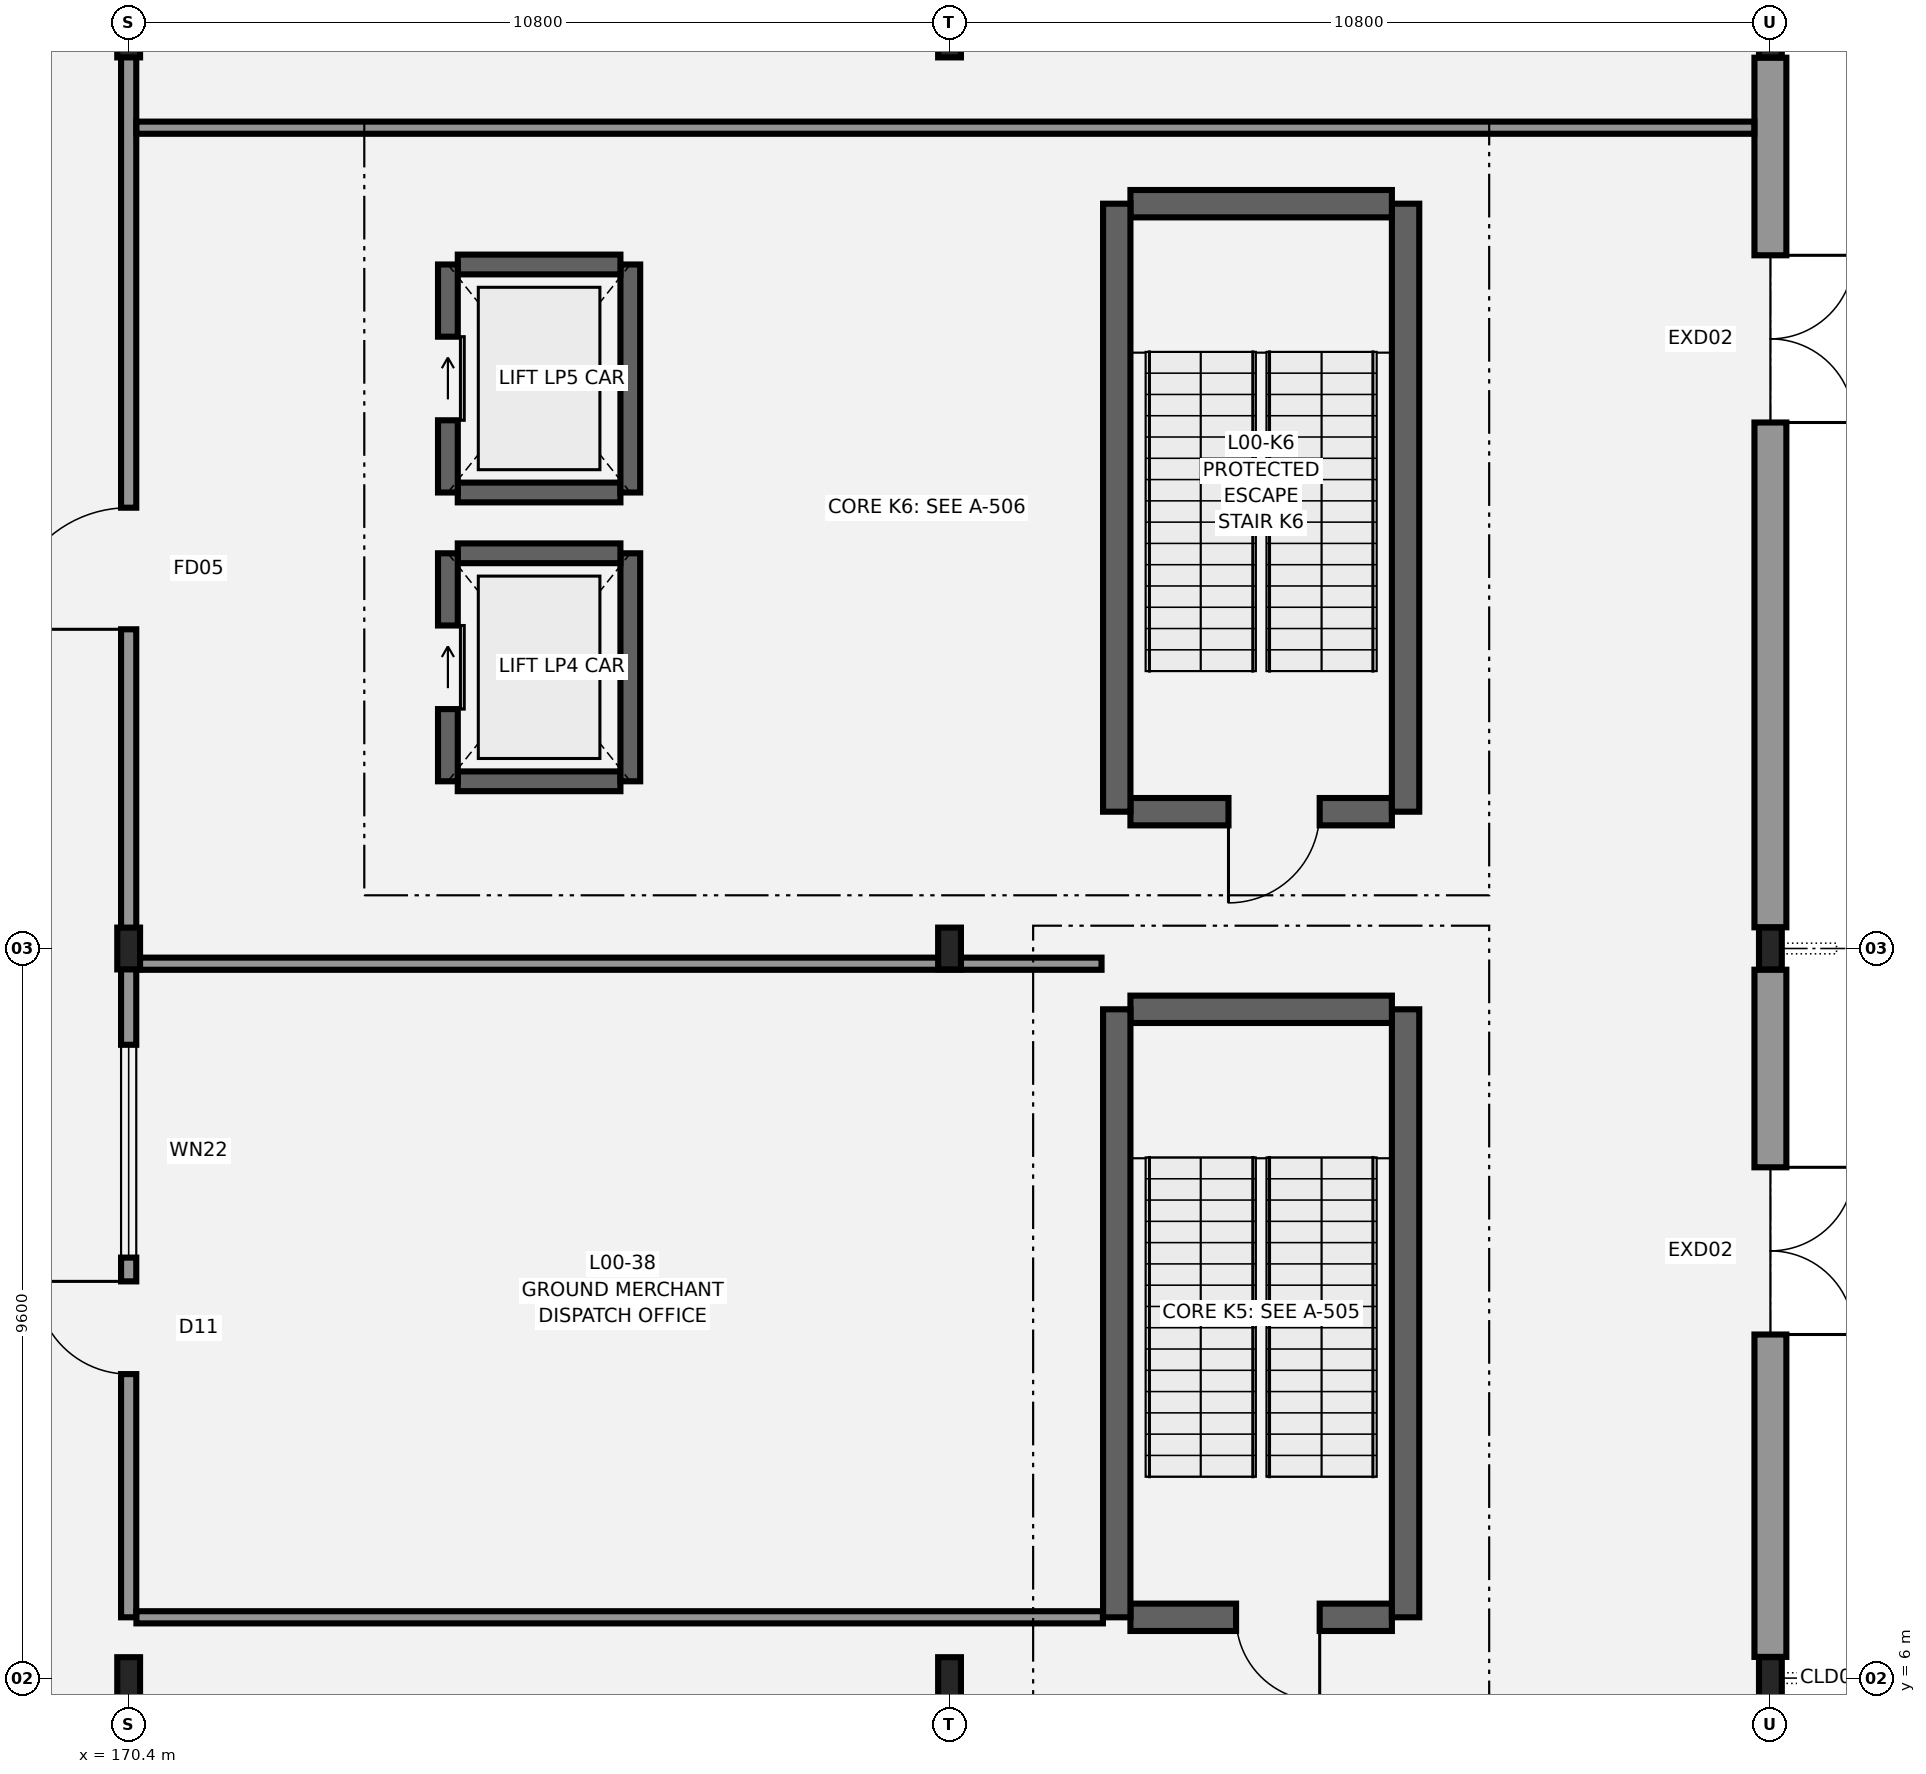
"""IFC4 building model, lengths in metres.
Left out: names, types, materials, properties, quantities, classifications, styles, units other than length and angle.
Written with IfcOpenShell. Run it as: python <this file> out.ifc"""

import sys

from ifc_helpers import new_model, si_unit, direction, frame, frame_2d, origin, origin_2d, place, context, subcontext, project, spatial, rectangle, i_section, extrude, element, fill, save


model = new_model("IFC4")
c1 = context("Model", 3, precision=1e-05, world=origin(), true_north=direction((0.0, 1.0)))
c2 = subcontext(c1, "Body", "Model", "MODEL_VIEW")
j1 = project(units=[si_unit("LENGTHUNIT", "METRE"), si_unit("PLANEANGLEUNIT", "RADIAN")], contexts=[c1])
p1 = place(None, origin())
s1 = spatial("IfcSite", under=j1, at=p1, CompositionType="ELEMENT")
p2 = place(p1, origin())
s2 = spatial("IfcBuilding", under=s1, at=p2, CompositionType="ELEMENT")
p3 = place(p2, origin())
s3 = spatial("IfcBuildingStorey", under=s2, at=p3, CompositionType="ELEMENT", Elevation=0.0)
for number, where, z_axis, x_axis in (
    (1, (170.4, 6.0, 0.0), (0.0, 0.0, 1.0), (1.0, 0.0, 0.0)),
    (2, (170.4, 15.6, 0.0), (0.0, 0.0, 1.0), (1.0, 0.0, 0.0)),
    (3, (170.4, 27.6, 0.0), (0.0, 0.0, 1.0), (1.0, 0.0, 0.0)),
    (4, (181.2, 6.0, 0.0), (0.0, 0.0, 1.0), (1.0, 0.0, 0.0)),
    (5, (181.2, 15.6, 0.0), (0.0, 0.0, 1.0), (1.0, 0.0, 0.0)),
    (6, (181.2, 27.6, 0.0), (0.0, 0.0, 1.0), (1.0, 0.0, 0.0)),
    (7, (192.0, 6.0, 0.0), (0.0, 0.0, 1.0), (1.0, 0.0, 0.0)),
    (8, (192.0, 15.6, 0.0), (0.0, 0.0, 1.0), (1.0, 0.0, 0.0)),
    (9, (192.0, 27.6, 0.0), (0.0, 0.0, 1.0), (1.0, 0.0, 0.0)),
):
    element("IfcColumn", number, at=place(p3, frame(where, z_axis=z_axis, x_axis=x_axis)), inside=s3, PredefinedType="COLUMN", context=c2, shape_type="SweptSolid", body=[
        extrude(i_section(OverallWidth=0.3, OverallDepth=0.55, WebThickness=0.015, FlangeThickness=0.029, FilletRadius=0.027, at=origin_2d()), origin(), (0.0, 0.0, 1.0), 5.4),
    ])
p4 = place(p3, frame((187.02, 6.8, 0.0), z_axis=(0.0, 0.0, 1.0), x_axis=(-1.0, 0.0, 0.0)))
e10 = element("IfcWall", 10, at=p4, inside=s3, PredefinedType="SHEAR", context=c2, shape_type="SweptSolid", body=[
    extrude(rectangle(XDim=3.44, YDim=0.36, at=frame_2d((1.72, 0.0))), origin(), (0.0, 0.0, 1.0), 5.12),
])
p5 = place(p4, frame((0.95, 0.0, 0.0)))
e11 = element("IfcOpeningElement", 11, at=p5, cuts=e10, PredefinedType="OPENING", context=c2, shape_type="SweptSolid", body=[
    extrude(rectangle(XDim=1.1, YDim=2.15, at=frame_2d((0.55, 1.075))), frame((0.0, 0.19, 0.0), z_axis=(0.0, -1.0, 0.0), x_axis=(1.0, 0.0, 0.0)), (0.0, 0.0, 1.0), 0.38),
])
p6 = place(p3, frame((187.2, 6.8, 0.0), z_axis=(0.0, 0.0, 1.0), x_axis=(0.0, 1.0, 0.0)))
e12 = element("IfcWall", 12, at=p6, inside=s3, PredefinedType="SHEAR", context=c2, shape_type="SweptSolid", body=[
    extrude(rectangle(XDim=8.0, YDim=0.36, at=frame_2d((4.0, 0.0))), origin(), (0.0, 0.0, 1.0), 5.12),
])
p7 = place(p3, frame((187.02, 14.8, 0.0), z_axis=(0.0, 0.0, 1.0), x_axis=(-1.0, 0.0, 0.0)))
e13 = element("IfcWall", 13, at=p7, inside=s3, PredefinedType="SHEAR", context=c2, shape_type="SweptSolid", body=[
    extrude(rectangle(XDim=3.44, YDim=0.36, at=frame_2d((1.72, 0.0))), origin(), (0.0, 0.0, 1.0), 5.12),
])
p8 = place(p3, frame((183.4, 14.8, 0.0), z_axis=(0.0, 0.0, 1.0), x_axis=(0.0, -1.0, 0.0)))
e14 = element("IfcWall", 14, at=p8, inside=s3, PredefinedType="SHEAR", context=c2, shape_type="SweptSolid", body=[
    extrude(rectangle(XDim=8.0, YDim=0.36, at=frame_2d((4.0, 0.0))), origin(), (0.0, 0.0, 1.0), 5.12),
])
p9 = place(p3, frame((187.02, 17.4, 0.0), z_axis=(0.0, 0.0, 1.0), x_axis=(-1.0, 0.0, 0.0)))
e15 = element("IfcWall", 15, at=p9, inside=s3, PredefinedType="SHEAR", context=c2, shape_type="SweptSolid", body=[
    extrude(rectangle(XDim=3.44, YDim=0.36, at=frame_2d((1.72, 0.0))), origin(), (0.0, 0.0, 1.0), 5.12),
])
p10 = place(p9, frame((0.95, 0.0, 0.0)))
e16 = element("IfcOpeningElement", 16, at=p10, cuts=e15, PredefinedType="OPENING", context=c2, shape_type="SweptSolid", body=[
    extrude(rectangle(XDim=1.2, YDim=2.2, at=frame_2d((0.6, 1.1))), frame((0.0, 0.19, 0.0), z_axis=(0.0, -1.0, 0.0), x_axis=(1.0, 0.0, 0.0)), (0.0, 0.0, 1.0), 0.38),
])
p11 = place(p3, frame((187.2, 17.4, 0.0), z_axis=(0.0, 0.0, 1.0), x_axis=(0.0, 1.0, 0.0)))
e17 = element("IfcWall", 17, at=p11, inside=s3, PredefinedType="SHEAR", context=c2, shape_type="SweptSolid", body=[
    extrude(rectangle(XDim=8.0, YDim=0.36, at=frame_2d((4.0, 0.0))), origin(), (0.0, 0.0, 1.0), 5.12),
])
p12 = place(p3, frame((187.02, 25.4, 0.0), z_axis=(0.0, 0.0, 1.0), x_axis=(-1.0, 0.0, 0.0)))
e18 = element("IfcWall", 18, at=p12, inside=s3, PredefinedType="SHEAR", context=c2, shape_type="SweptSolid", body=[
    extrude(rectangle(XDim=3.44, YDim=0.36, at=frame_2d((1.72, 0.0))), origin(), (0.0, 0.0, 1.0), 5.12),
])
p13 = place(p3, frame((183.4, 25.4, 0.0), z_axis=(0.0, 0.0, 1.0), x_axis=(0.0, -1.0, 0.0)))
e19 = element("IfcWall", 19, at=p13, inside=s3, PredefinedType="SHEAR", context=c2, shape_type="SweptSolid", body=[
    extrude(rectangle(XDim=8.0, YDim=0.36, at=frame_2d((4.0, 0.0))), origin(), (0.0, 0.0, 1.0), 5.12),
])
p14 = place(p3, frame((174.73, 17.8, 0.0), z_axis=(0.0, 0.0, 1.0), x_axis=(1.0, 0.0, 0.0)))
e20 = element("IfcWall", 20, at=p14, inside=s3, PredefinedType="SHEAR", context=c2, shape_type="SweptSolid", body=[
    extrude(rectangle(XDim=2.14, YDim=0.26, at=frame_2d((1.07, 0.0))), origin(), (0.0, 0.0, 1.0), 5.12),
])
p15 = place(p3, frame((177.0, 17.8, 0.0), z_axis=(0.0, 0.0, 1.0), x_axis=(0.0, 1.0, 0.0)))
e21 = element("IfcWall", 21, at=p15, inside=s3, PredefinedType="SHEAR", context=c2, shape_type="SweptSolid", body=[
    extrude(rectangle(XDim=3.0, YDim=0.26, at=frame_2d((1.5, 0.0))), origin(), (0.0, 0.0, 1.0), 5.12),
])
p16 = place(p3, frame((176.87, 20.8, 0.0), z_axis=(0.0, 0.0, 1.0), x_axis=(-1.0, 0.0, 0.0)))
e22 = element("IfcWall", 22, at=p16, inside=s3, PredefinedType="SHEAR", context=c2, shape_type="SweptSolid", body=[
    extrude(rectangle(XDim=2.14, YDim=0.26, at=frame_2d((1.07, 0.0))), origin(), (0.0, 0.0, 1.0), 5.12),
])
p17 = place(p3, frame((174.6, 20.8, 0.0), z_axis=(0.0, 0.0, 1.0), x_axis=(0.0, -1.0, 0.0)))
e23 = element("IfcWall", 23, at=p17, inside=s3, PredefinedType="SHEAR", context=c2, shape_type="SweptSolid", body=[
    extrude(rectangle(XDim=3.0, YDim=0.26, at=frame_2d((1.5, 0.0))), origin(), (0.0, 0.0, 1.0), 5.12),
])
p18 = place(p17, frame((0.95, 0.0, 0.0)))
e24 = element("IfcOpeningElement", 24, at=p18, cuts=e23, PredefinedType="OPENING", context=c2, shape_type="SweptSolid", body=[
    extrude(rectangle(XDim=1.1, YDim=2.1, at=frame_2d((0.55, 1.05))), frame((0.0, 0.14, 0.0), z_axis=(0.0, -1.0, 0.0), x_axis=(1.0, 0.0, 0.0)), (0.0, 0.0, 1.0), 0.28),
])
p19 = place(p3, frame((174.73, 21.6, 0.0), z_axis=(0.0, 0.0, 1.0), x_axis=(1.0, 0.0, 0.0)))
e25 = element("IfcWall", 25, at=p19, inside=s3, PredefinedType="SHEAR", context=c2, shape_type="SweptSolid", body=[
    extrude(rectangle(XDim=2.14, YDim=0.26, at=frame_2d((1.07, 0.0))), origin(), (0.0, 0.0, 1.0), 5.12),
])
p20 = place(p3, frame((177.0, 21.6, 0.0), z_axis=(0.0, 0.0, 1.0), x_axis=(0.0, 1.0, 0.0)))
e26 = element("IfcWall", 26, at=p20, inside=s3, PredefinedType="SHEAR", context=c2, shape_type="SweptSolid", body=[
    extrude(rectangle(XDim=3.0, YDim=0.26, at=frame_2d((1.5, 0.0))), origin(), (0.0, 0.0, 1.0), 5.12),
])
p21 = place(p3, frame((176.87, 24.6, 0.0), z_axis=(0.0, 0.0, 1.0), x_axis=(-1.0, 0.0, 0.0)))
e27 = element("IfcWall", 27, at=p21, inside=s3, PredefinedType="SHEAR", context=c2, shape_type="SweptSolid", body=[
    extrude(rectangle(XDim=2.14, YDim=0.26, at=frame_2d((1.07, 0.0))), origin(), (0.0, 0.0, 1.0), 5.12),
])
p22 = place(p3, frame((174.6, 24.6, 0.0), z_axis=(0.0, 0.0, 1.0), x_axis=(0.0, -1.0, 0.0)))
e28 = element("IfcWall", 28, at=p22, inside=s3, PredefinedType="SHEAR", context=c2, shape_type="SweptSolid", body=[
    extrude(rectangle(XDim=3.0, YDim=0.26, at=frame_2d((1.5, 0.0))), origin(), (0.0, 0.0, 1.0), 5.12),
])
p23 = place(p22, frame((0.95, 0.0, 0.0)))
e29 = element("IfcOpeningElement", 29, at=p23, cuts=e28, PredefinedType="OPENING", context=c2, shape_type="SweptSolid", body=[
    extrude(rectangle(XDim=1.1, YDim=2.1, at=frame_2d((0.55, 1.05))), frame((0.0, 0.14, 0.0), z_axis=(0.0, -1.0, 0.0), x_axis=(1.0, 0.0, 0.0)), (0.0, 0.0, 1.0), 0.28),
])
p24 = place(p3, frame((192.0, 15.321, 0.0), z_axis=(0.0, 0.0, 1.0), x_axis=(0.0, -1.0, 0.0)))
e30 = element("IfcWall", 30, at=p24, inside=s3, PredefinedType="STANDARD", context=c2, shape_type="SweptSolid", body=[
    extrude(rectangle(XDim=9.042, YDim=0.42, at=frame_2d((4.521, 0.0))), origin(), (0.0, 0.0, 1.0), 4.765),
])
p25 = place(p24, frame((2.6, 0.0, 0.0)))
e31 = element("IfcOpeningElement", 31, at=p25, cuts=e30, PredefinedType="OPENING", context=c2, shape_type="SweptSolid", body=[
    extrude(rectangle(XDim=2.2, YDim=2.4, at=frame_2d((1.1, 1.2))), frame((0.0, 0.22, 0.0), z_axis=(0.0, -1.0, 0.0), x_axis=(1.0, 0.0, 0.0)), (0.0, 0.0, 1.0), 0.44),
])
p26 = place(p3, frame((192.0, 27.321, 0.0), z_axis=(0.0, 0.0, 1.0), x_axis=(0.0, -1.0, 0.0)))
e32 = element("IfcWall", 32, at=p26, inside=s3, PredefinedType="STANDARD", context=c2, shape_type="SweptSolid", body=[
    extrude(rectangle(XDim=11.442, YDim=0.42, at=frame_2d((5.721, 0.0))), origin(), (0.0, 0.0, 1.0), 4.765),
])
p27 = place(p26, frame((2.6, 0.0, 0.0)))
e33 = element("IfcOpeningElement", 33, at=p27, cuts=e32, PredefinedType="OPENING", context=c2, shape_type="SweptSolid", body=[
    extrude(rectangle(XDim=2.2, YDim=2.4, at=frame_2d((1.1, 1.2))), frame((0.0, 0.22, 0.0), z_axis=(0.0, -1.0, 0.0), x_axis=(1.0, 0.0, 0.0)), (0.0, 0.0, 1.0), 0.44),
])
p28 = place(p3, frame((170.4, 6.8, 0.0), z_axis=(0.0, 0.0, 1.0), x_axis=(0.0, 1.0, 0.0)))
e34 = element("IfcWall", 34, at=p28, inside=s3, PredefinedType="PARTITIONING", context=c2, shape_type="SweptSolid", body=[
    extrude(rectangle(XDim=56.628, YDim=0.2, at=frame_2d((28.314, 0.0))), origin(), (0.0, 0.0, 1.0), 4.765),
])
p29 = place(p28, frame((3.2, 0.0, 0.0)))
e35 = element("IfcOpeningElement", 35, at=p29, cuts=e34, PredefinedType="OPENING", context=c2, shape_type="SweptSolid", body=[
    extrude(rectangle(XDim=1.22, YDim=2.15, at=frame_2d((0.61, 1.075))), frame((0.0, 0.11, 0.0), z_axis=(0.0, -1.0, 0.0), x_axis=(1.0, 0.0, 0.0)), (0.0, 0.0, 1.0), 0.22),
])
p30 = place(p28, frame((13.0, 0.0, 0.0)))
e36 = element("IfcOpeningElement", 36, at=p30, cuts=e34, PredefinedType="OPENING", context=c2, shape_type="SweptSolid", body=[
    extrude(rectangle(XDim=1.6, YDim=2.2, at=frame_2d((0.8, 1.1))), frame((0.0, 0.11, 0.0), z_axis=(0.0, -1.0, 0.0), x_axis=(1.0, 0.0, 0.0)), (0.0, 0.0, 1.0), 0.22),
])
p31 = place(p28, frame((26.0, 0.0, 0.0)))
e37 = element("IfcOpeningElement", 37, at=p31, cuts=e34, PredefinedType="OPENING", context=c2, shape_type="SweptSolid", body=[
    extrude(rectangle(XDim=1.5, YDim=2.15, at=frame_2d((0.75, 1.075))), frame((0.0, 0.11, 0.0), z_axis=(0.0, -1.0, 0.0), x_axis=(1.0, 0.0, 0.0)), (0.0, 0.0, 1.0), 0.22),
])
p32 = place(p28, frame((47.6, 0.0, 0.0)))
e38 = element("IfcOpeningElement", 38, at=p32, cuts=e34, PredefinedType="OPENING", context=c2, shape_type="SweptSolid", body=[
    extrude(rectangle(XDim=1.5, YDim=2.15, at=frame_2d((0.75, 1.075))), frame((0.0, 0.11, 0.0), z_axis=(0.0, -1.0, 0.0), x_axis=(1.0, 0.0, 0.0)), (0.0, 0.0, 1.0), 0.22),
])
p33 = place(p28, frame((53.2, 0.0, 0.0)))
e39 = element("IfcOpeningElement", 39, at=p33, cuts=e34, PredefinedType="OPENING", context=c2, shape_type="SweptSolid", body=[
    extrude(rectangle(XDim=1.02, YDim=2.12, at=frame_2d((0.51, 1.06))), frame((0.0, 0.11, 0.0), z_axis=(0.0, -1.0, 0.0), x_axis=(1.0, 0.0, 0.0)), (0.0, 0.0, 1.0), 0.22),
])
p34 = place(p28, frame((4.733, 0.0, 1.05)))
e40 = element("IfcOpeningElement", 40, at=p34, cuts=e34, PredefinedType="OPENING", context=c2, shape_type="SweptSolid", body=[
    extrude(rectangle(XDim=2.8, YDim=1.3, at=frame_2d((1.4, 0.65))), frame((0.0, 0.11, 0.0), z_axis=(0.0, -1.0, 0.0), x_axis=(1.0, 0.0, 0.0)), (0.0, 0.0, 1.0), 0.22),
])
p35 = place(p3, frame((170.502, 6.8, 0.0), z_axis=(0.0, 0.0, 1.0), x_axis=(1.0, 0.0, 0.0)))
e41 = element("IfcWall", 41, at=p35, inside=s3, PredefinedType="PARTITIONING", context=c2, shape_type="SweptSolid", body=[
    extrude(rectangle(XDim=12.716, YDim=0.16, at=frame_2d((6.358, 0.0))), origin(), (0.0, 0.0, 1.0), 5.04),
])
p36 = place(p3, frame((170.502, 15.4, 0.0), z_axis=(0.0, 0.0, 1.0), x_axis=(1.0, 0.0, 0.0)))
e42 = element("IfcWall", 42, at=p36, inside=s3, PredefinedType="PARTITIONING", context=c2, shape_type="SweptSolid", body=[
    extrude(rectangle(XDim=12.698, YDim=0.16, at=frame_2d((6.349, 0.0))), origin(), (0.0, 0.0, 1.0), 4.665),
])
p37 = place(p3, frame((170.502, 26.4, 0.0), z_axis=(0.0, 0.0, 1.0), x_axis=(1.0, 0.0, 0.0)))
e43 = element("IfcWall", 43, at=p37, inside=s3, PredefinedType="PARTITIONING", context=c2, shape_type="SweptSolid", body=[
    extrude(rectangle(XDim=21.286, YDim=0.16, at=frame_2d((10.643, 0.0))), origin(), (0.0, 0.0, 1.0), 5.04),
])
p38 = place(p25, origin())
e44 = element("IfcDoor", 44, at=p38, inside=s3, OperationType="DOUBLE_DOOR_SINGLE_SWING", PredefinedType="DOOR", context=c2, shape_type="SweptSolid", body=[
    extrude(rectangle(XDim=2.2, YDim=2.4, at=frame_2d((1.1, 1.2))), frame((0.0, 0.025, 0.0), z_axis=(0.0, -1.0, 0.0), x_axis=(1.0, 0.0, 0.0)), (0.0, 0.0, 1.0), 0.05),
])
fill(e31, e44)
p39 = place(p27, origin())
e45 = element("IfcDoor", 45, at=p39, inside=s3, OperationType="DOUBLE_DOOR_SINGLE_SWING", PredefinedType="DOOR", context=c2, shape_type="SweptSolid", body=[
    extrude(rectangle(XDim=2.2, YDim=2.4, at=frame_2d((1.1, 1.2))), frame((0.0, 0.025, 0.0), z_axis=(0.0, -1.0, 0.0), x_axis=(1.0, 0.0, 0.0)), (0.0, 0.0, 1.0), 0.05),
])
fill(e33, e45)
p40 = place(p29, origin())
e46 = element("IfcDoor", 46, at=p40, inside=s3, OperationType="SINGLE_SWING_RIGHT", PredefinedType="DOOR", context=c2, shape_type="SweptSolid", body=[
    extrude(rectangle(XDim=1.22, YDim=2.15, at=frame_2d((0.61, 1.075))), frame((0.0, 0.025, 0.0), z_axis=(0.0, -1.0, 0.0), x_axis=(1.0, 0.0, 0.0)), (0.0, 0.0, 1.0), 0.05),
])
fill(e35, e46)
p41 = place(p30, origin())
e47 = element("IfcDoor", 47, at=p41, inside=s3, OperationType="SINGLE_SWING_LEFT", PredefinedType="DOOR", context=c2, shape_type="SweptSolid", body=[
    extrude(rectangle(XDim=1.6, YDim=2.2, at=frame_2d((0.8, 1.1))), frame((0.0, 0.025, 0.0), z_axis=(0.0, -1.0, 0.0), x_axis=(1.0, 0.0, 0.0)), (0.0, 0.0, 1.0), 0.05),
])
fill(e36, e47)
p42 = place(p34, origin())
e48 = element("IfcWindow", 48, at=p42, inside=s3, PartitioningType="SINGLE_PANEL", PredefinedType="WINDOW", context=c2, shape_type="SweptSolid", body=[
    extrude(rectangle(XDim=2.8, YDim=1.3, at=frame_2d((1.4, 0.65))), frame((0.0, 0.03, 0.0), z_axis=(0.0, -1.0, 0.0), x_axis=(1.0, 0.0, 0.0)), (0.0, 0.0, 1.0), 0.06),
])
fill(e40, e48)
p43 = place(p5, origin())
e49 = element("IfcDoor", 49, at=p43, inside=s3, OperationType="SINGLE_SWING_LEFT", PredefinedType="DOOR", context=c2, shape_type="SweptSolid", body=[
    extrude(rectangle(XDim=1.1, YDim=2.15, at=frame_2d((0.55, 1.075))), frame((0.0, 0.025, 0.0), z_axis=(0.0, -1.0, 0.0), x_axis=(1.0, 0.0, 0.0)), (0.0, 0.0, 1.0), 0.05),
])
fill(e11, e49)
p44 = place(p10, origin())
e50 = element("IfcDoor", 50, at=p44, inside=s3, OperationType="SINGLE_SWING_RIGHT", PredefinedType="DOOR", context=c2, shape_type="SweptSolid", body=[
    extrude(rectangle(XDim=1.2, YDim=2.2, at=frame_2d((0.6, 1.1))), frame((0.0, 0.025, 0.0), z_axis=(0.0, -1.0, 0.0), x_axis=(1.0, 0.0, 0.0)), (0.0, 0.0, 1.0), 0.05),
])
fill(e16, e50)
p45 = place(p18, origin())
e51 = element("IfcDoor", 51, at=p45, inside=s3, OperationType="SLIDING_TO_LEFT", PredefinedType="DOOR", context=c2, shape_type="SweptSolid", body=[
    extrude(rectangle(XDim=1.1, YDim=2.1, at=frame_2d((0.55, 1.05))), frame((0.0, 0.025, 0.0), z_axis=(0.0, -1.0, 0.0), x_axis=(1.0, 0.0, 0.0)), (0.0, 0.0, 1.0), 0.05),
])
fill(e24, e51)
p46 = place(p23, origin())
e52 = element("IfcDoor", 52, at=p46, inside=s3, OperationType="SLIDING_TO_LEFT", PredefinedType="DOOR", context=c2, shape_type="SweptSolid", body=[
    extrude(rectangle(XDim=1.1, YDim=2.1, at=frame_2d((0.55, 1.05))), frame((0.0, 0.025, 0.0), z_axis=(0.0, -1.0, 0.0), x_axis=(1.0, 0.0, 0.0)), (0.0, 0.0, 1.0), 0.05),
])
fill(e29, e52)
save(model, sys.argv[1])
